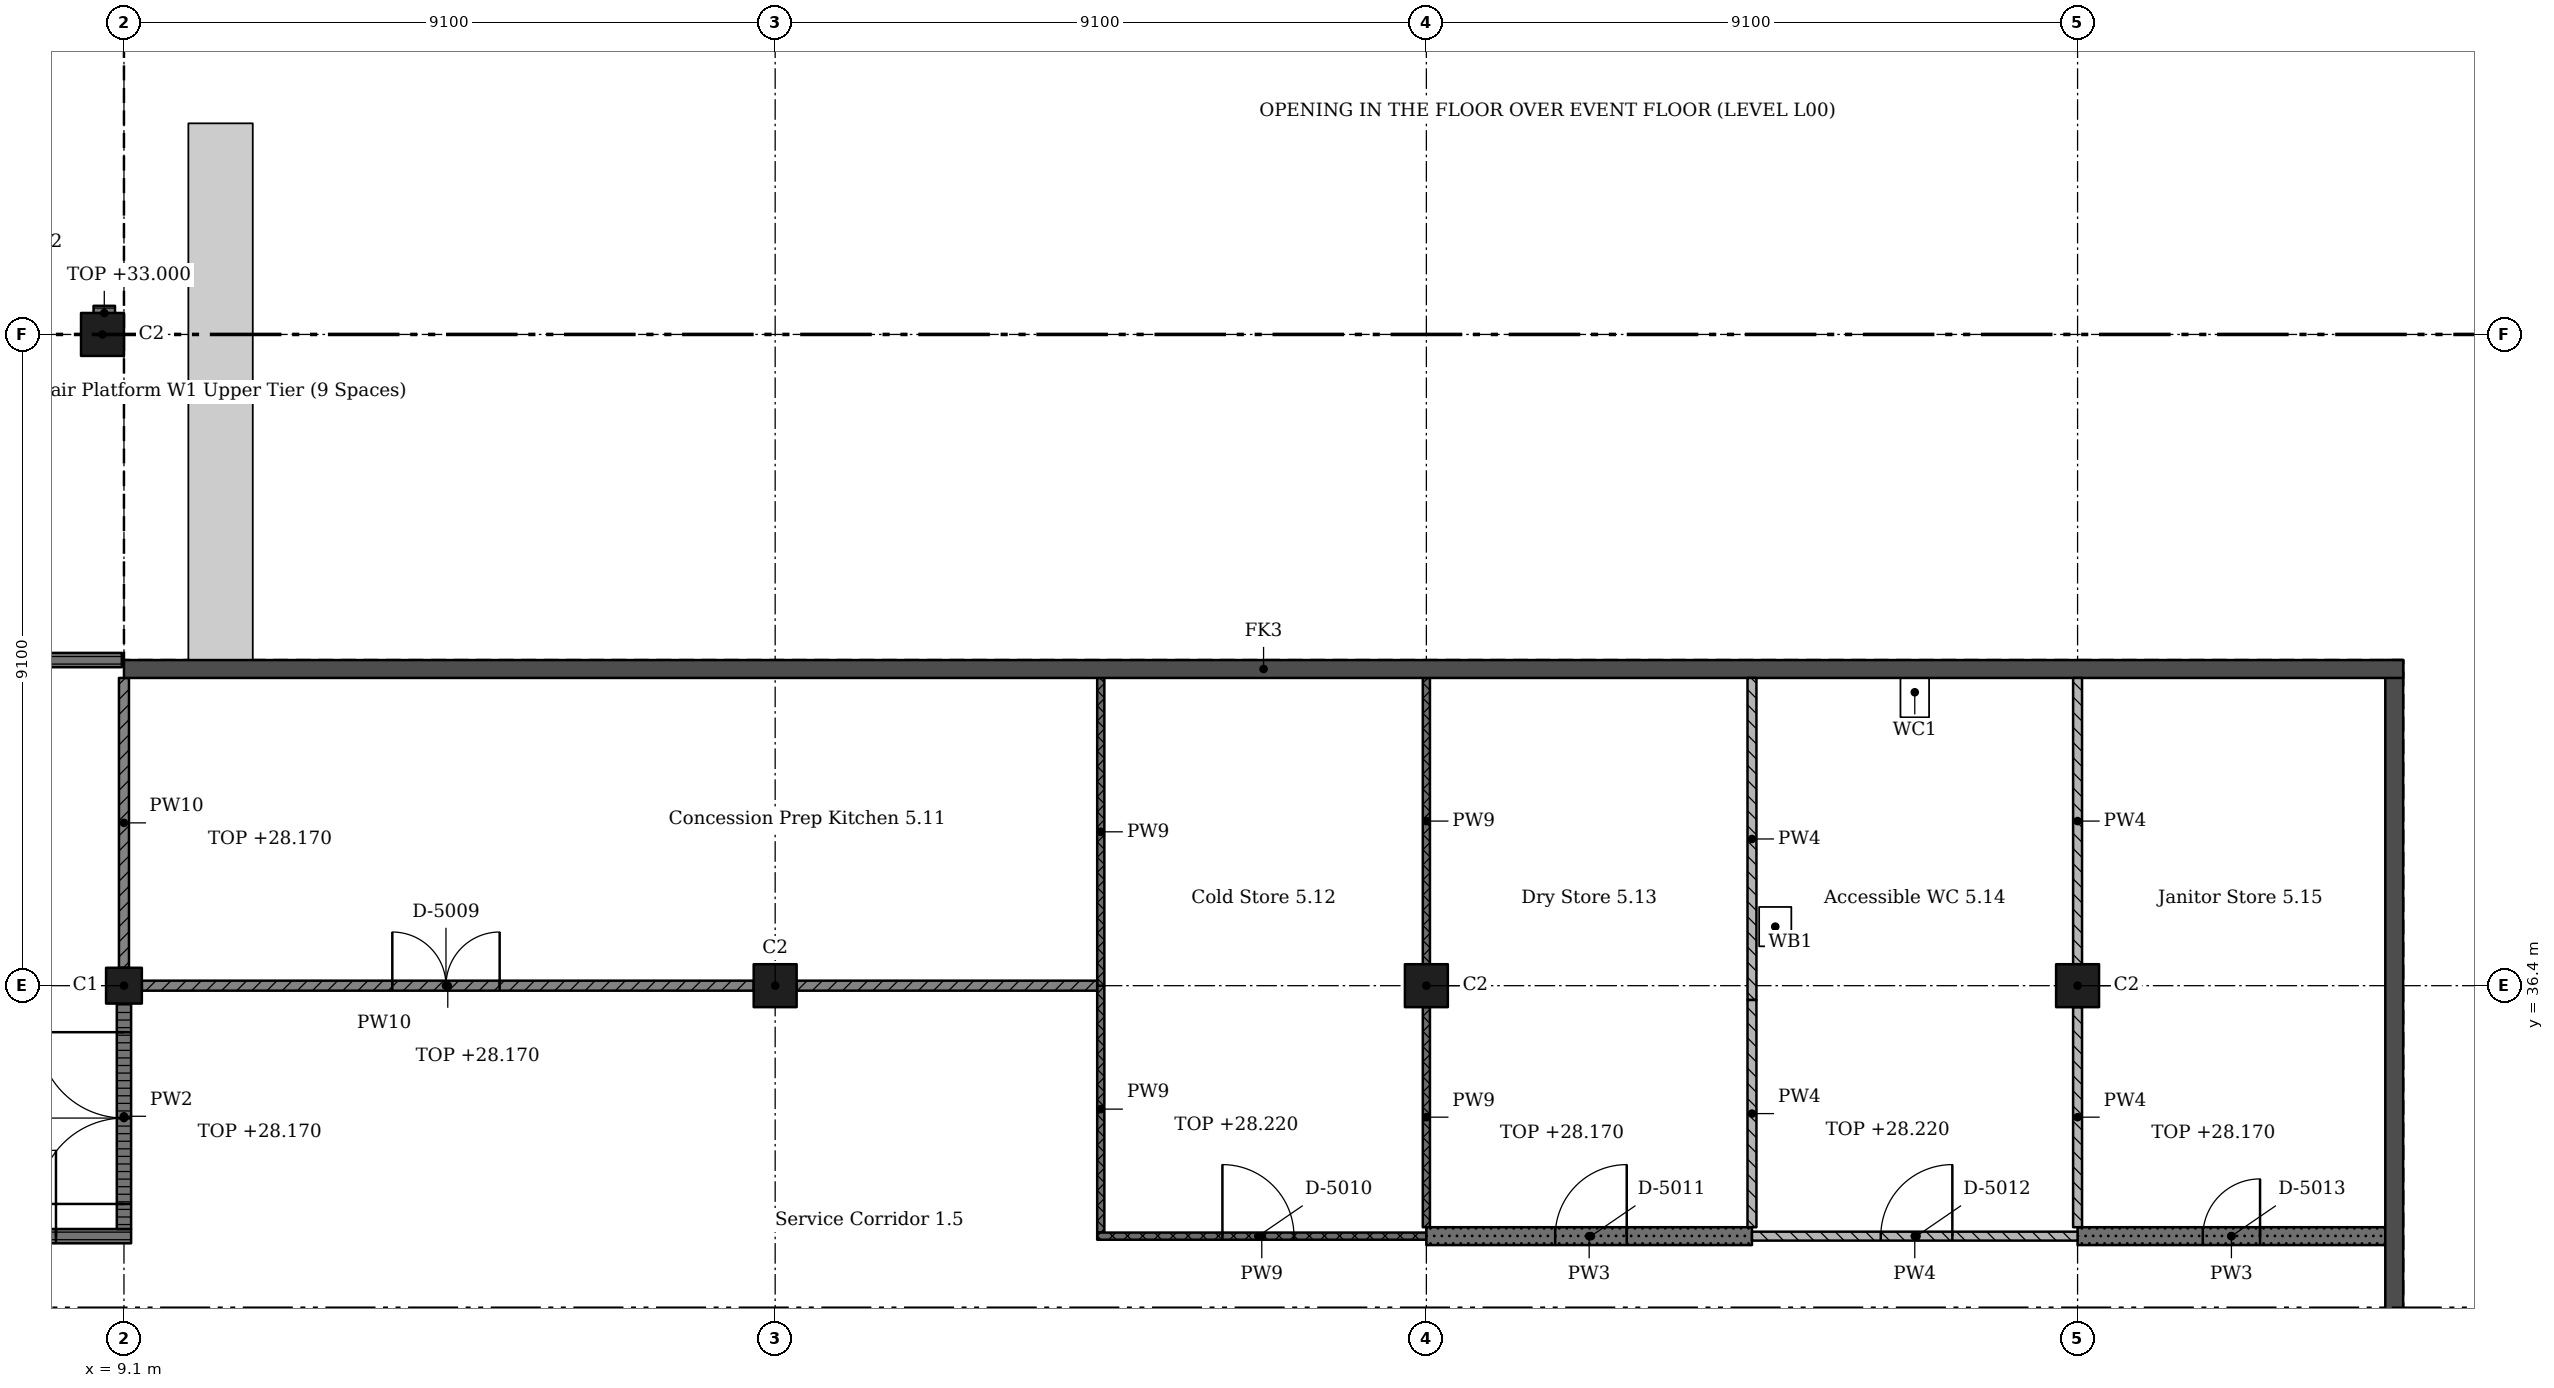
"""IFC4 building model, lengths in metres.
Left out: names, types, materials, properties, quantities, classifications, styles, units other than length and angle.
Written with IfcOpenShell. Run it as: python <this file> out.ifc"""

import sys

from ifc_helpers import new_model, si_unit, direction, frame, frame_2d, origin, origin_2d, place, context, subcontext, project, spatial, rectangle, extrude, element, fill, save


model = new_model("IFC4")
c1 = context("Model", 3, precision=1e-05, world=origin(), true_north=direction((0.0, 1.0)))
c2 = subcontext(c1, "Body", "Model", "MODEL_VIEW")
j1 = project(units=[si_unit("LENGTHUNIT", "METRE"), si_unit("PLANEANGLEUNIT", "RADIAN")], contexts=[c1])
p1 = place(None, origin())
s1 = spatial("IfcSite", under=j1, at=p1, CompositionType="ELEMENT")
p2 = place(p1, origin())
s2 = spatial("IfcBuilding", under=s1, at=p2, CompositionType="ELEMENT")
p3 = place(p2, frame((0.0, 0.0, 24.57)))
s3 = spatial("IfcBuildingStorey", under=s2, at=p3, CompositionType="ELEMENT", Elevation=24.57)
p4 = place(p3, frame((9.1, 36.4, 0.0), z_axis=(0.0, 0.0, 1.0), x_axis=(1.0, 0.0, 0.0)))
e1 = element("IfcColumn", 1, at=p4, inside=s3, PredefinedType="COLUMN", context=c2, shape_type="SweptSolid", body=[
    extrude(rectangle(XDim=0.5, YDim=0.5, at=origin_2d()), origin(), (0.0, 0.0, 1.0), 4.55),
])
for number, where, z_axis, x_axis in (
    (2, (8.8, 45.5, 0.0), (0.0, 0.0, 1.0), (1.0, 0.0, 0.0)),
    (3, (18.2, 36.4, 0.0), (0.0, 0.0, 1.0), (1.0, 0.0, 0.0)),
    (4, (27.3, 36.4, 0.0), (0.0, 0.0, 1.0), (1.0, 0.0, 0.0)),
    (5, (36.4, 36.4, 0.0), (0.0, 0.0, 1.0), (1.0, 0.0, 0.0)),
):
    element("IfcColumn", number, at=place(p3, frame(where, z_axis=z_axis, x_axis=x_axis)), inside=s3, PredefinedType="COLUMN", context=c2, shape_type="SweptSolid", body=[
        extrude(rectangle(XDim=0.6, YDim=0.6, at=origin_2d()), origin(), (0.0, 0.0, 1.0), 4.55),
    ])
for number, where, z_axis, x_axis in (
    (6, (40.825, 40.95, 0.0), (0.0, 0.0, 1.0), (0.0, -1.0, 0.0)),
    (7, (40.95, 40.825, 0.0), (0.0, 0.0, 1.0), (-1.0, 0.0, 0.0)),
):
    element("IfcWall", number, at=place(p3, frame(where, z_axis=z_axis, x_axis=x_axis)), inside=s3, PredefinedType="SHEAR", context=c2, shape_type="SweptSolid", body=[
        extrude(rectangle(XDim=31.85, YDim=0.25, at=frame_2d((15.925, 0.0))), origin(), (0.0, 0.0, 1.0), 4.55),
    ])
p5 = place(p3, frame((0.1, 32.9, 0.0), z_axis=(0.0, 0.0, 1.0), x_axis=(1.0, 0.0, 0.0)))
e8 = element("IfcWall", 8, at=p5, inside=s3, PredefinedType="PARTITIONING", context=c2, shape_type="SweptSolid", body=[
    extrude(rectangle(XDim=9.1, YDim=0.2, at=frame_2d((4.55, 0.0))), origin(), (0.0, 0.0, 1.0), 4.35),
])
p6 = place(p5, frame((1.05, 0.0, 0.0)))
e9 = element("IfcOpeningElement", 9, at=p6, cuts=e8, PredefinedType="OPENING", context=c2, shape_type="SweptSolid", body=[
    extrude(rectangle(XDim=2.4, YDim=2.4, at=frame_2d((1.2, 1.2))), frame((0.0, 0.11, 0.0), z_axis=(0.0, -1.0, 0.0), x_axis=(1.0, 0.0, 0.0)), (0.0, 0.0, 1.0), 0.22),
])
p7 = place(p5, frame((5.65, 0.0, 0.0)))
e10 = element("IfcOpeningElement", 10, at=p7, cuts=e8, PredefinedType="OPENING", context=c2, shape_type="SweptSolid", body=[
    extrude(rectangle(XDim=2.4, YDim=2.4, at=frame_2d((1.2, 1.2))), frame((0.0, 0.11, 0.0), z_axis=(0.0, -1.0, 0.0), x_axis=(1.0, 0.0, 0.0)), (0.0, 0.0, 1.0), 0.22),
])
p8 = place(p3, frame((0.1, 40.95, 0.0), z_axis=(0.0, 0.0, 1.0), x_axis=(1.0, 0.0, 0.0)))
e11 = element("IfcWall", 11, at=p8, inside=s3, PredefinedType="PARTITIONING", context=c2, shape_type="SweptSolid", body=[
    extrude(rectangle(XDim=8.97, YDim=0.2, at=frame_2d((4.485, 0.0))), origin(), (0.0, 0.0, 1.0), 3.55),
])
p9 = place(p8, frame((4.75, 0.0, 0.0)))
e12 = element("IfcOpeningElement", 12, at=p9, cuts=e11, PredefinedType="OPENING", context=c2, shape_type="SweptSolid", body=[
    extrude(rectangle(XDim=3.0, YDim=2.4, at=frame_2d((1.5, 1.2))), frame((0.0, 0.11, 0.0), z_axis=(0.0, -1.0, 0.0), x_axis=(1.0, 0.0, 0.0)), (0.0, 0.0, 1.0), 0.22),
])
p10 = place(p8, frame((0.25, 0.0, 0.0)))
e13 = element("IfcOpeningElement", 13, at=p10, cuts=e11, PredefinedType="OPENING", context=c2, shape_type="SweptSolid", body=[
    extrude(rectangle(XDim=3.0, YDim=2.4, at=frame_2d((1.5, 1.2))), frame((0.0, 0.11, 0.0), z_axis=(0.0, -1.0, 0.0), x_axis=(1.0, 0.0, 0.0)), (0.0, 0.0, 1.0), 0.22),
])
p11 = place(p3, frame((8.975, 45.8, 0.0), z_axis=(0.0, 0.0, 1.0), x_axis=(-1.0, 0.0, 0.0)))
e14 = element("IfcWall", 14, at=p11, inside=s3, PredefinedType="PARTITIONING", context=c2, shape_type="SweptSolid", body=[
    extrude(rectangle(XDim=0.3, YDim=0.2, at=frame_2d((0.15, 0.0))), origin(), (0.0, 0.0, 1.0), 8.43),
])
p12 = place(p3, frame((9.1, 33.0, 0.0), z_axis=(0.0, 0.0, 1.0), x_axis=(0.0, 1.0, 0.0)))
e15 = element("IfcWall", 15, at=p12, inside=s3, PredefinedType="PARTITIONING", context=c2, shape_type="SweptSolid", body=[
    extrude(rectangle(XDim=3.15, YDim=0.2, at=frame_2d((1.575, 0.0))), origin(), (0.0, 0.0, 1.0), 3.6),
])
p13 = place(p12, frame((0.35, 0.0, 0.0)))
e16 = element("IfcOpeningElement", 16, at=p13, cuts=e15, PredefinedType="OPENING", context=c2, shape_type="SweptSolid", body=[
    extrude(rectangle(XDim=2.4, YDim=2.4, at=frame_2d((1.2, 1.2))), frame((0.0, 0.11, 0.0), z_axis=(0.0, -1.0, 0.0), x_axis=(1.0, 0.0, 0.0)), (0.0, 0.0, 1.0), 0.22),
])
p14 = place(p3, frame((9.1, 36.65, 0.0), z_axis=(0.0, 0.0, 1.0), x_axis=(0.0, 1.0, 0.0)))
e17 = element("IfcWall", 17, at=p14, inside=s3, PredefinedType="SOLIDWALL", context=c2, shape_type="SweptSolid", body=[
    extrude(rectangle(XDim=4.05, YDim=0.14, at=frame_2d((2.025, 0.0))), origin(), (0.0, 0.0, 1.0), 3.6),
])
p15 = place(p3, frame((17.9, 36.4, 0.0), z_axis=(0.0, 0.0, 1.0), x_axis=(-1.0, 0.0, 0.0)))
e18 = element("IfcWall", 18, at=p15, inside=s3, PredefinedType="SOLIDWALL", context=c2, shape_type="SweptSolid", body=[
    extrude(rectangle(XDim=8.55, YDim=0.14, at=frame_2d((4.275, 0.0))), origin(), (0.0, 0.0, 1.0), 3.6),
])
p16 = place(p15, frame((3.55, 0.0, 0.0)))
e19 = element("IfcOpeningElement", 19, at=p16, cuts=e18, PredefinedType="OPENING", context=c2, shape_type="SweptSolid", body=[
    extrude(rectangle(XDim=1.5, YDim=2.1, at=frame_2d((0.75, 1.05))), frame((0.0, 0.08, 0.0), z_axis=(0.0, -1.0, 0.0), x_axis=(1.0, 0.0, 0.0)), (0.0, 0.0, 1.0), 0.16),
])
p17 = place(p3, frame((22.7, 36.4, 0.0), z_axis=(0.0, 0.0, 1.0), x_axis=(-1.0, 0.0, 0.0)))
e20 = element("IfcWall", 20, at=p17, inside=s3, PredefinedType="SOLIDWALL", context=c2, shape_type="SweptSolid", body=[
    extrude(rectangle(XDim=4.2, YDim=0.14, at=frame_2d((2.1, 0.0))), origin(), (0.0, 0.0, 1.0), 3.6),
])
p18 = place(p3, frame((22.75, 32.95, 0.0), z_axis=(0.0, 0.0, 1.0), x_axis=(0.0, 1.0, 0.0)))
e21 = element("IfcWall", 21, at=p18, inside=s3, PredefinedType="SOLIDWALL", context=c2, shape_type="SweptSolid", body=[
    extrude(rectangle(XDim=3.45, YDim=0.1, at=frame_2d((1.725, 0.0))), origin(), (0.0, 0.0, 1.0), 3.65),
])
p19 = place(p3, frame((22.75, 40.7, 0.0), z_axis=(0.0, 0.0, 1.0), x_axis=(0.0, -1.0, 0.0)))
e22 = element("IfcWall", 22, at=p19, inside=s3, PredefinedType="SOLIDWALL", context=c2, shape_type="SweptSolid", body=[
    extrude(rectangle(XDim=4.3, YDim=0.1, at=frame_2d((2.15, 0.0))), origin(), (0.0, 0.0, 1.0), 4.35),
])
p20 = place(p3, frame((27.3, 32.9, 0.0), z_axis=(0.0, 0.0, 1.0), x_axis=(-1.0, 0.0, 0.0)))
e23 = element("IfcWall", 23, at=p20, inside=s3, PredefinedType="SOLIDWALL", context=c2, shape_type="SweptSolid", body=[
    extrude(rectangle(XDim=4.6, YDim=0.1, at=frame_2d((2.3, 0.0))), origin(), (0.0, 0.0, 1.0), 4.35),
])
p21 = place(p20, frame((1.85, 0.0, 0.0)))
e24 = element("IfcOpeningElement", 24, at=p21, cuts=e23, PredefinedType="OPENING", context=c2, shape_type="SweptSolid", body=[
    extrude(rectangle(XDim=1.0, YDim=2.0, at=frame_2d((0.5, 1.0))), frame((0.0, 0.06, 0.0), z_axis=(0.0, -1.0, 0.0), x_axis=(1.0, 0.0, 0.0)), (0.0, 0.0, 1.0), 0.12),
])
p22 = place(p3, frame((27.3, 36.1, 0.0), z_axis=(0.0, 0.0, 1.0), x_axis=(0.0, -1.0, 0.0)))
e25 = element("IfcWall", 25, at=p22, inside=s3, PredefinedType="SOLIDWALL", context=c2, shape_type="SweptSolid", body=[
    extrude(rectangle(XDim=3.075, YDim=0.1, at=frame_2d((1.538, 0.0))), origin(), (0.0, 0.0, 1.0), 3.6),
])
p23 = place(p3, frame((27.3, 40.7, 0.0), z_axis=(0.0, 0.0, 1.0), x_axis=(0.0, -1.0, 0.0)))
e26 = element("IfcWall", 26, at=p23, inside=s3, PredefinedType="SOLIDWALL", context=c2, shape_type="SweptSolid", body=[
    extrude(rectangle(XDim=4.0, YDim=0.1, at=frame_2d((2.0, 0.0))), origin(), (0.0, 0.0, 1.0), 4.35),
])
p24 = place(p3, frame((31.85, 32.9, 0.0), z_axis=(0.0, 0.0, 1.0), x_axis=(-1.0, 0.0, 0.0)))
e27 = element("IfcWall", 27, at=p24, inside=s3, PredefinedType="SOLIDWALL", context=c2, shape_type="SweptSolid", body=[
    extrude(rectangle(XDim=4.55, YDim=0.25, at=frame_2d((2.275, 0.0))), origin(), (0.0, 0.0, 1.0), 4.35),
])
p25 = place(p24, frame((1.75, 0.0, 0.0)))
e28 = element("IfcOpeningElement", 28, at=p25, cuts=e27, PredefinedType="OPENING", context=c2, shape_type="SweptSolid", body=[
    extrude(rectangle(XDim=1.0, YDim=2.1, at=frame_2d((0.5, 1.05))), frame((0.0, 0.135, 0.0), z_axis=(0.0, -1.0, 0.0), x_axis=(1.0, 0.0, 0.0)), (0.0, 0.0, 1.0), 0.27),
])
p26 = place(p3, frame((31.85, 40.7, 0.0), z_axis=(0.0, 0.0, 1.0), x_axis=(0.0, -1.0, 0.0)))
e29 = element("IfcWall", 29, at=p26, inside=s3, PredefinedType="PARTITIONING", context=c2, shape_type="SweptSolid", body=[
    extrude(rectangle(XDim=4.5, YDim=0.125, at=frame_2d((2.25, 0.0))), origin(), (0.0, 0.0, 1.0), 4.35),
])
p27 = place(p3, frame((36.4, 32.9, 0.0), z_axis=(0.0, 0.0, 1.0), x_axis=(-1.0, 0.0, 0.0)))
e30 = element("IfcWall", 30, at=p27, inside=s3, PredefinedType="PARTITIONING", context=c2, shape_type="SweptSolid", body=[
    extrude(rectangle(XDim=4.55, YDim=0.125, at=frame_2d((2.275, 0.0))), origin(), (0.0, 0.0, 1.0), 4.35),
])
p28 = place(p27, frame((1.75, 0.0, 0.0)))
e31 = element("IfcOpeningElement", 31, at=p28, cuts=e30, PredefinedType="OPENING", context=c2, shape_type="SweptSolid", body=[
    extrude(rectangle(XDim=1.0, YDim=2.1, at=frame_2d((0.5, 1.05))), frame((0.0, 0.073, 0.0), z_axis=(0.0, -1.0, 0.0), x_axis=(1.0, 0.0, 0.0)), (0.0, 0.0, 1.0), 0.145),
])
p29 = place(p3, frame((36.4, 36.1, 0.0), z_axis=(0.0, 0.0, 1.0), x_axis=(0.0, -1.0, 0.0)))
e32 = element("IfcWall", 32, at=p29, inside=s3, PredefinedType="PARTITIONING", context=c2, shape_type="SweptSolid", body=[
    extrude(rectangle(XDim=3.075, YDim=0.125, at=frame_2d((1.538, 0.0))), origin(), (0.0, 0.0, 1.0), 3.6),
])
p30 = place(p3, frame((36.4, 40.7, 0.0), z_axis=(0.0, 0.0, 1.0), x_axis=(0.0, -1.0, 0.0)))
e33 = element("IfcWall", 33, at=p30, inside=s3, PredefinedType="PARTITIONING", context=c2, shape_type="SweptSolid", body=[
    extrude(rectangle(XDim=4.0, YDim=0.125, at=frame_2d((2.0, 0.0))), origin(), (0.0, 0.0, 1.0), 4.35),
])
p31 = place(p3, frame((40.7, 32.9, 0.0), z_axis=(0.0, 0.0, 1.0), x_axis=(-1.0, 0.0, 0.0)))
e34 = element("IfcWall", 34, at=p31, inside=s3, PredefinedType="SOLIDWALL", context=c2, shape_type="SweptSolid", body=[
    extrude(rectangle(XDim=4.3, YDim=0.25, at=frame_2d((2.15, 0.0))), origin(), (0.0, 0.0, 1.0), 4.35),
])
p32 = place(p31, frame((1.75, 0.0, 0.0)))
e35 = element("IfcOpeningElement", 35, at=p32, cuts=e34, PredefinedType="OPENING", context=c2, shape_type="SweptSolid", body=[
    extrude(rectangle(XDim=0.8, YDim=2.1, at=frame_2d((0.4, 1.05))), frame((0.0, 0.135, 0.0), z_axis=(0.0, -1.0, 0.0), x_axis=(1.0, 0.0, 0.0)), (0.0, 0.0, 1.0), 0.27),
])
p33 = place(p3, frame((31.85, 36.2, 0.0), z_axis=(0.0, 0.0, 1.0), x_axis=(0.0, -1.0, 0.0)))
e36 = element("IfcWall", 36, at=p33, inside=s3, PredefinedType="PARTITIONING", context=c2, shape_type="SweptSolid", body=[
    extrude(rectangle(XDim=3.175, YDim=0.125, at=frame_2d((1.587, 0.0))), origin(), (0.0, 0.0, 1.0), 3.65),
])
p34 = place(p16, origin())
e37 = element("IfcDoor", 37, at=p34, inside=s3, OperationType="DOUBLE_DOOR_SINGLE_SWING", PredefinedType="DOOR", context=c2, shape_type="SweptSolid", body=[
    extrude(rectangle(XDim=1.5, YDim=2.1, at=frame_2d((0.75, 1.05))), frame((0.0, 0.025, 0.0), z_axis=(0.0, -1.0, 0.0), x_axis=(1.0, 0.0, 0.0)), (0.0, 0.0, 1.0), 0.05),
])
fill(e19, e37)
p35 = place(p21, origin())
e38 = element("IfcDoor", 38, at=p35, inside=s3, OperationType="SINGLE_SWING_RIGHT", PredefinedType="DOOR", context=c2, shape_type="SweptSolid", body=[
    extrude(rectangle(XDim=1.0, YDim=2.0, at=frame_2d((0.5, 1.0))), frame((0.0, 0.025, 0.0), z_axis=(0.0, -1.0, 0.0), x_axis=(1.0, 0.0, 0.0)), (0.0, 0.0, 1.0), 0.05),
])
fill(e24, e38)
p36 = place(p25, origin())
e39 = element("IfcDoor", 39, at=p36, inside=s3, OperationType="SINGLE_SWING_LEFT", PredefinedType="DOOR", context=c2, shape_type="SweptSolid", body=[
    extrude(rectangle(XDim=1.0, YDim=2.1, at=frame_2d((0.5, 1.05))), frame((0.0, 0.025, 0.0), z_axis=(0.0, -1.0, 0.0), x_axis=(1.0, 0.0, 0.0)), (0.0, 0.0, 1.0), 0.05),
])
fill(e28, e39)
p37 = place(p28, origin())
e40 = element("IfcDoor", 40, at=p37, inside=s3, OperationType="SINGLE_SWING_LEFT", PredefinedType="DOOR", context=c2, shape_type="SweptSolid", body=[
    extrude(rectangle(XDim=1.0, YDim=2.1, at=frame_2d((0.5, 1.05))), frame((0.0, 0.025, 0.0), z_axis=(0.0, -1.0, 0.0), x_axis=(1.0, 0.0, 0.0)), (0.0, 0.0, 1.0), 0.05),
])
fill(e31, e40)
p38 = place(p32, origin())
e41 = element("IfcDoor", 41, at=p38, inside=s3, OperationType="SINGLE_SWING_LEFT", PredefinedType="DOOR", context=c2, shape_type="SweptSolid", body=[
    extrude(rectangle(XDim=0.8, YDim=2.1, at=frame_2d((0.4, 1.05))), frame((0.0, 0.025, 0.0), z_axis=(0.0, -1.0, 0.0), x_axis=(1.0, 0.0, 0.0)), (0.0, 0.0, 1.0), 0.05),
])
fill(e35, e41)
p39 = place(p7, origin())
e42 = element("IfcDoor", 42, at=p39, inside=s3, OperationType="DOUBLE_DOOR_SINGLE_SWING", PredefinedType="DOOR", context=c2, shape_type="SweptSolid", body=[
    extrude(rectangle(XDim=2.4, YDim=2.4, at=frame_2d((1.2, 1.2))), frame((0.0, 0.025, 0.0), z_axis=(0.0, -1.0, 0.0), x_axis=(1.0, 0.0, 0.0)), (0.0, 0.0, 1.0), 0.05),
])
fill(e10, e42)
p40 = place(p13, origin())
e43 = element("IfcDoor", 43, at=p40, inside=s3, OperationType="DOUBLE_DOOR_SINGLE_SWING", PredefinedType="DOOR", context=c2, shape_type="SweptSolid", body=[
    extrude(rectangle(XDim=2.4, YDim=2.4, at=frame_2d((1.2, 1.2))), frame((0.0, 0.025, 0.0), z_axis=(0.0, -1.0, 0.0), x_axis=(1.0, 0.0, 0.0)), (0.0, 0.0, 1.0), 0.05),
])
fill(e16, e43)
save(model, sys.argv[1])
